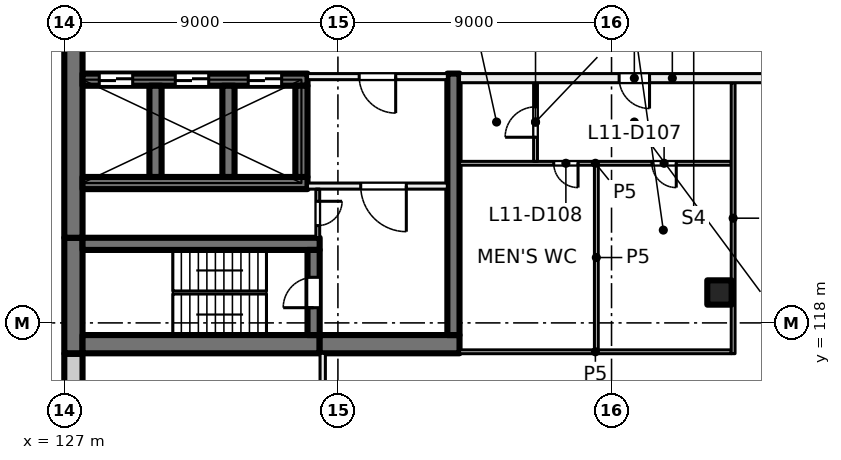
"""IFC4 building model, lengths in metres.
Left out: names, types, materials, properties, quantities, classifications, styles, units other than length and angle.
Written with IfcOpenShell. Run it as: python <this file> out.ifc"""

import sys

from ifc_helpers import new_model, si_unit, direction, frame, frame_2d, origin, origin_2d, place, context, subcontext, project, spatial, rectangle, extrude, element, fill, save


model = new_model("IFC4")
c1 = context("Model", 3, precision=1e-05, world=origin(), true_north=direction((0.0, 1.0)))
c2 = subcontext(c1, "Body", "Model", "MODEL_VIEW")
j1 = project(units=[si_unit("LENGTHUNIT", "METRE"), si_unit("PLANEANGLEUNIT", "RADIAN")], contexts=[c1])
p1 = place(None, origin())
s1 = spatial("IfcSite", under=j1, at=p1, CompositionType="ELEMENT")
p2 = place(p1, origin())
s2 = spatial("IfcBuilding", under=s1, at=p2, CompositionType="ELEMENT")
p3 = place(p2, frame((0.0, 0.0, 51.5)))
s3 = spatial("IfcBuildingStorey", under=s2, at=p3, CompositionType="ELEMENT", Elevation=51.5)
p4 = place(p3, frame((148.55, 119.0, 0.0), z_axis=(0.0, 0.0, 1.0), x_axis=(1.0, 0.0, 0.0)))
e1 = element("IfcColumn", 1, at=p4, inside=s3, PredefinedType="COLUMN", context=c2, shape_type="SweptSolid", body=[
    extrude(rectangle(XDim=0.8, YDim=0.8, at=origin_2d()), origin(), (0.0, 0.0, 1.0), 4.0),
])
p5 = place(p3, frame((127.3, 117.0, 0.0), z_axis=(0.0, 0.0, 1.0), x_axis=(0.0, 1.0, 0.0)))
e2 = element("IfcWall", 2, at=p5, inside=s3, PredefinedType="SHEAR", context=c2, shape_type="SweptSolid", body=[
    extrude(rectangle(XDim=3.8, YDim=0.6, at=frame_2d((1.9, 0.0))), origin(), (0.0, 0.0, 1.0), 4.0),
])
p6 = place(p3, frame((127.3, 120.8, 0.0), z_axis=(0.0, 0.0, 1.0), x_axis=(0.0, 1.0, 0.0)))
e3 = element("IfcWall", 3, at=p6, inside=s3, PredefinedType="SHEAR", context=c2, shape_type="SweptSolid", body=[
    extrude(rectangle(XDim=14.4, YDim=0.6, at=frame_2d((7.2, 0.0))), origin(), (0.0, 0.0, 1.0), 4.0),
])
p7 = place(p3, frame((127.6, 117.3, 0.0), z_axis=(0.0, 0.0, 1.0), x_axis=(1.0, 0.0, 0.0)))
e4 = element("IfcWall", 4, at=p7, inside=s3, PredefinedType="SHEAR", context=c2, shape_type="SweptSolid", body=[
    extrude(rectangle(XDim=7.8, YDim=0.6, at=frame_2d((3.9, 0.0))), origin(), (0.0, 0.0, 1.0), 4.0),
])
p8 = place(p3, frame((135.4, 117.3, 0.0), z_axis=(0.0, 0.0, 1.0), x_axis=(1.0, 0.0, 0.0)))
e5 = element("IfcWall", 5, at=p8, inside=s3, PredefinedType="SHEAR", context=c2, shape_type="SweptSolid", body=[
    extrude(rectangle(XDim=4.6, YDim=0.6, at=frame_2d((2.3, 0.0))), origin(), (0.0, 0.0, 1.0), 4.0),
])
p9 = place(p3, frame((127.6, 120.6, 0.0), z_axis=(0.0, 0.0, 1.0), x_axis=(1.0, 0.0, 0.0)))
e6 = element("IfcWall", 6, at=p9, inside=s3, PredefinedType="SHEAR", context=c2, shape_type="SweptSolid", body=[
    extrude(rectangle(XDim=7.8, YDim=0.4, at=frame_2d((3.9, 0.0))), origin(), (0.0, 0.0, 1.0), 4.0),
])
p10 = place(p3, frame((135.2, 117.6, 0.0), z_axis=(0.0, 0.0, 1.0), x_axis=(0.0, 1.0, 0.0)))
e7 = element("IfcWall", 7, at=p10, inside=s3, PredefinedType="SHEAR", context=c2, shape_type="SweptSolid", body=[
    extrude(rectangle(XDim=2.8, YDim=0.4, at=frame_2d((1.4, 0.0))), origin(), (0.0, 0.0, 1.0), 4.0),
])
p11 = place(p10, frame((0.9, 0.0, 0.0)))
e8 = element("IfcOpeningElement", 8, at=p11, cuts=e7, PredefinedType="OPENING", context=c2, shape_type="SweptSolid", body=[
    extrude(rectangle(XDim=1.0, YDim=2.1, at=frame_2d((0.5, 1.05))), frame((0.0, 0.21, 0.0), z_axis=(0.0, -1.0, 0.0), x_axis=(1.0, 0.0, 0.0)), (0.0, 0.0, 1.0), 0.42),
])
p12 = place(p3, frame((127.6, 126.0, 0.0), z_axis=(0.0, 0.0, 1.0), x_axis=(1.0, 0.0, 0.0)))
e9 = element("IfcWall", 9, at=p12, inside=s3, PredefinedType="SHEAR", context=c2, shape_type="SweptSolid", body=[
    extrude(rectangle(XDim=7.4, YDim=0.4, at=frame_2d((3.7, 0.0))), origin(), (0.0, 0.0, 1.0), 4.0),
])
p13 = place(p12, frame((0.55, 0.0, 0.0)))
e10 = element("IfcOpeningElement", 10, at=p13, cuts=e9, PredefinedType="OPENING", context=c2, shape_type="SweptSolid", body=[
    extrude(rectangle(XDim=1.1, YDim=2.1, at=frame_2d((0.55, 1.05))), frame((0.0, 0.21, 0.0), z_axis=(0.0, -1.0, 0.0), x_axis=(1.0, 0.0, 0.0)), (0.0, 0.0, 1.0), 0.42),
])
p14 = place(p12, frame((3.05, 0.0, 0.0)))
e11 = element("IfcOpeningElement", 11, at=p14, cuts=e9, PredefinedType="OPENING", context=c2, shape_type="SweptSolid", body=[
    extrude(rectangle(XDim=1.1, YDim=2.1, at=frame_2d((0.55, 1.05))), frame((0.0, 0.21, 0.0), z_axis=(0.0, -1.0, 0.0), x_axis=(1.0, 0.0, 0.0)), (0.0, 0.0, 1.0), 0.42),
])
p15 = place(p12, frame((5.45, 0.0, 0.0)))
e12 = element("IfcOpeningElement", 12, at=p15, cuts=e9, PredefinedType="OPENING", context=c2, shape_type="SweptSolid", body=[
    extrude(rectangle(XDim=1.1, YDim=2.1, at=frame_2d((0.55, 1.05))), frame((0.0, 0.21, 0.0), z_axis=(0.0, -1.0, 0.0), x_axis=(1.0, 0.0, 0.0)), (0.0, 0.0, 1.0), 0.42),
])
p16 = place(p3, frame((127.6, 122.6, 0.0), z_axis=(0.0, 0.0, 1.0), x_axis=(1.0, 0.0, 0.0)))
e13 = element("IfcWall", 13, at=p16, inside=s3, PredefinedType="SHEAR", context=c2, shape_type="SweptSolid", body=[
    extrude(rectangle(XDim=7.4, YDim=0.4, at=frame_2d((3.7, 0.0))), origin(), (0.0, 0.0, 1.0), 4.0),
])
for number, where, z_axis, x_axis in (
    (14, (130.0, 122.8, 0.0), (0.0, 0.0, 1.0), (0.0, 1.0, 0.0)),
    (15, (132.4, 122.8, 0.0), (0.0, 0.0, 1.0), (0.0, 1.0, 0.0)),
    (16, (134.8, 122.8, 0.0), (0.0, 0.0, 1.0), (0.0, 1.0, 0.0)),
):
    element("IfcWall", number, at=place(p3, frame(where, z_axis=z_axis, x_axis=x_axis)), inside=s3, PredefinedType="SHEAR", context=c2, shape_type="SweptSolid", body=[
        extrude(rectangle(XDim=3.0, YDim=0.4, at=frame_2d((1.5, 0.0))), origin(), (0.0, 0.0, 1.0), 4.0),
    ])
p17 = place(p3, frame((139.8, 117.6, 0.0), z_axis=(0.0, 0.0, 1.0), x_axis=(0.0, 1.0, 0.0)))
e17 = element("IfcWall", 17, at=p17, inside=s3, PredefinedType="SHEAR", context=c2, shape_type="SweptSolid", body=[
    extrude(rectangle(XDim=8.6, YDim=0.4, at=frame_2d((4.3, 0.0))), origin(), (0.0, 0.0, 1.0), 4.0),
])
p18 = place(p3, frame((127.3, 114.07, 0.0), z_axis=(0.0, 0.0, 1.0), x_axis=(0.0, 1.0, 0.0)))
e18 = element("IfcWall", 18, at=p18, inside=s3, PredefinedType="SOLIDWALL", context=c2, shape_type="SweptSolid", body=[
    extrude(rectangle(XDim=2.91, YDim=0.6, at=frame_2d((1.455, 0.0))), origin(), (0.0, 0.0, 1.0), 3.625),
])
p19 = place(p3, frame((139.6, 126.1, 0.0), z_axis=(0.0, 0.0, 1.0), x_axis=(-1.0, 0.0, 0.0)))
e19 = element("IfcWall", 19, at=p19, inside=s3, PredefinedType="PARTITIONING", context=c2, shape_type="SweptSolid", body=[
    extrude(rectangle(XDim=4.6, YDim=0.2, at=frame_2d((2.3, 0.0))), origin(), (0.0, 0.0, 1.0), 3.625),
])
p20 = place(p19, frame((1.7, 0.0, 0.0)))
e20 = element("IfcOpeningElement", 20, at=p20, cuts=e19, PredefinedType="OPENING", context=c2, shape_type="SweptSolid", body=[
    extrude(rectangle(XDim=1.2, YDim=2.1, at=frame_2d((0.6, 1.05))), frame((0.0, 0.11, 0.0), z_axis=(0.0, -1.0, 0.0), x_axis=(1.0, 0.0, 0.0)), (0.0, 0.0, 1.0), 0.22),
])
p21 = place(p3, frame((139.6, 122.5, 0.0), z_axis=(0.0, 0.0, 1.0), x_axis=(-1.0, 0.0, 0.0)))
e21 = element("IfcWall", 21, at=p21, inside=s3, PredefinedType="PARTITIONING", context=c2, shape_type="SweptSolid", body=[
    extrude(rectangle(XDim=4.6, YDim=0.2, at=frame_2d((2.3, 0.0))), origin(), (0.0, 0.0, 1.0), 3.625),
])
p22 = place(p21, frame((1.35, 0.0, 0.0)))
e22 = element("IfcOpeningElement", 22, at=p22, cuts=e21, PredefinedType="OPENING", context=c2, shape_type="SweptSolid", body=[
    extrude(rectangle(XDim=1.5, YDim=2.1, at=frame_2d((0.75, 1.05))), frame((0.0, 0.11, 0.0), z_axis=(0.0, -1.0, 0.0), x_axis=(1.0, 0.0, 0.0)), (0.0, 0.0, 1.0), 0.22),
])
p23 = place(p3, frame((135.337, 122.4, 0.0), z_axis=(0.0, 0.0, 1.0), x_axis=(0.0, -1.0, 0.0)))
e23 = element("IfcWall", 23, at=p23, inside=s3, PredefinedType="PARTITIONING", context=c2, shape_type="SweptSolid", body=[
    extrude(rectangle(XDim=1.6, YDim=0.125, at=frame_2d((0.8, 0.0))), origin(), (0.0, 0.0, 1.0), 3.625),
])
p24 = place(p23, frame((0.4, 0.0, 0.0)))
e24 = element("IfcOpeningElement", 24, at=p24, cuts=e23, PredefinedType="OPENING", context=c2, shape_type="SweptSolid", body=[
    extrude(rectangle(XDim=0.8, YDim=2.1, at=frame_2d((0.4, 1.05))), frame((0.0, 0.073, 0.0), z_axis=(0.0, -1.0, 0.0), x_axis=(1.0, 0.0, 0.0)), (0.0, 0.0, 1.0), 0.145),
])
p25 = place(p3, frame((135.5, 117.0, 0.0), z_axis=(0.0, 0.0, 1.0), x_axis=(0.0, -1.0, 0.0)))
e25 = element("IfcWall", 25, at=p25, inside=s3, PredefinedType="PARTITIONING", context=c2, shape_type="SweptSolid", body=[
    extrude(rectangle(XDim=6.4, YDim=0.175, at=frame_2d((3.2, 0.0))), origin(), (0.0, 0.0, 1.0), 3.625),
])
p26 = place(p25, frame((2.6, 0.0, 0.0)))
e26 = element("IfcOpeningElement", 26, at=p26, cuts=e25, PredefinedType="OPENING", context=c2, shape_type="SweptSolid", body=[
    extrude(rectangle(XDim=1.2, YDim=2.1, at=frame_2d((0.6, 1.05))), frame((0.0, 0.097, 0.0), z_axis=(0.0, -1.0, 0.0), x_axis=(1.0, 0.0, 0.0)), (0.0, 0.0, 1.0), 0.195),
])
p27 = place(p3, frame((140.0, 117.05, 0.0), z_axis=(0.0, 0.0, 1.0), x_axis=(1.0, 0.0, 0.0)))
e27 = element("IfcWall", 27, at=p27, inside=s3, PredefinedType="PARTITIONING", context=c2, shape_type="SweptSolid", body=[
    extrude(rectangle(XDim=8.938, YDim=0.125, at=frame_2d((4.469, 0.0))), origin(), (0.0, 0.0, 1.0), 3.625),
])
p28 = place(p3, frame((148.938, 123.25, 0.0), z_axis=(0.0, 0.0, 1.0), x_axis=(-1.0, 0.0, 0.0)))
e28 = element("IfcWall", 28, at=p28, inside=s3, PredefinedType="PARTITIONING", context=c2, shape_type="SweptSolid", body=[
    extrude(rectangle(XDim=8.938, YDim=0.125, at=frame_2d((4.469, 0.0))), origin(), (0.0, 0.0, 1.0), 3.625),
])
p29 = place(p28, frame((1.809, 0.0, 0.0)))
e29 = element("IfcOpeningElement", 29, at=p29, cuts=e28, PredefinedType="OPENING", context=c2, shape_type="SweptSolid", body=[
    extrude(rectangle(XDim=0.8, YDim=2.1, at=frame_2d((0.4, 1.05))), frame((0.0, 0.073, 0.0), z_axis=(0.0, -1.0, 0.0), x_axis=(1.0, 0.0, 0.0)), (0.0, 0.0, 1.0), 0.145),
])
p30 = place(p28, frame((5.04, 0.0, 0.0)))
e30 = element("IfcOpeningElement", 30, at=p30, cuts=e28, PredefinedType="OPENING", context=c2, shape_type="SweptSolid", body=[
    extrude(rectangle(XDim=0.8, YDim=2.1, at=frame_2d((0.4, 1.05))), frame((0.0, 0.073, 0.0), z_axis=(0.0, -1.0, 0.0), x_axis=(1.0, 0.0, 0.0)), (0.0, 0.0, 1.0), 0.145),
])
p31 = place(p3, frame((142.5, 123.312, 0.0), z_axis=(0.0, 0.0, 1.0), x_axis=(0.0, 1.0, 0.0)))
e31 = element("IfcWall", 31, at=p31, inside=s3, PredefinedType="PARTITIONING", context=c2, shape_type="SweptSolid", body=[
    extrude(rectangle(XDim=2.588, YDim=0.125, at=frame_2d((1.294, 0.0))), origin(), (0.0, 0.0, 1.0), 3.625),
])
p32 = place(p31, frame((0.794, 0.0, 0.0)))
e32 = element("IfcOpeningElement", 32, at=p32, cuts=e31, PredefinedType="OPENING", context=c2, shape_type="SweptSolid", body=[
    extrude(rectangle(XDim=1.0, YDim=2.1, at=frame_2d((0.5, 1.05))), frame((0.0, 0.073, 0.0), z_axis=(0.0, -1.0, 0.0), x_axis=(1.0, 0.0, 0.0)), (0.0, 0.0, 1.0), 0.145),
])
p33 = place(p3, frame((144.5, 123.188, 0.0), z_axis=(0.0, 0.0, 1.0), x_axis=(0.0, -1.0, 0.0)))
e33 = element("IfcWall", 33, at=p33, inside=s3, PredefinedType="PARTITIONING", context=c2, shape_type="SweptSolid", body=[
    extrude(rectangle(XDim=6.076, YDim=0.125, at=frame_2d((3.038, 0.0))), origin(), (0.0, 0.0, 1.0), 3.625),
])
p34 = place(p3, frame((149.0, 116.988, 0.0), z_axis=(0.0, 0.0, 1.0), x_axis=(0.0, 1.0, 0.0)))
e34 = element("IfcWall", 34, at=p34, inside=s3, PredefinedType="PARTITIONING", context=c2, shape_type="SweptSolid", body=[
    extrude(rectangle(XDim=8.912, YDim=0.125, at=frame_2d((4.456, 0.0))), origin(), (0.0, 0.0, 1.0), 3.625),
])
p35 = place(p3, frame((154.0, 126.05, 0.0), z_axis=(0.0, 0.0, 1.0), x_axis=(-1.0, 0.0, 0.0)))
e35 = element("IfcWall", 35, at=p35, inside=s3, PredefinedType="PARTITIONING", context=c2, shape_type="SweptSolid", body=[
    extrude(rectangle(XDim=14.0, YDim=0.3, at=frame_2d((7.0, 0.0))), origin(), (0.0, 0.0, 1.0), 3.625),
])
p36 = place(p35, frame((7.75, 0.0, 0.0)))
e36 = element("IfcOpeningElement", 36, at=p36, cuts=e35, PredefinedType="OPENING", context=c2, shape_type="SweptSolid", body=[
    extrude(rectangle(XDim=1.0, YDim=2.1, at=frame_2d((0.5, 1.05))), frame((0.0, 0.16, 0.0), z_axis=(0.0, -1.0, 0.0), x_axis=(1.0, 0.0, 0.0)), (0.0, 0.0, 1.0), 0.32),
])
p37 = place(p35, frame((1.6, 0.0, 0.0)))
e37 = element("IfcOpeningElement", 37, at=p37, cuts=e35, PredefinedType="OPENING", context=c2, shape_type="SweptSolid", body=[
    extrude(rectangle(XDim=1.8, YDim=2.1, at=frame_2d((0.9, 1.05))), frame((0.0, 0.16, 0.0), z_axis=(0.0, -1.0, 0.0), x_axis=(1.0, 0.0, 0.0)), (0.0, 0.0, 1.0), 0.32),
])
p38 = place(p13, origin())
e38 = element("IfcDoor", 38, at=p38, inside=s3, OperationType="DOUBLE_DOOR_SLIDING", PredefinedType="DOOR", context=c2, shape_type="SweptSolid", body=[
    extrude(rectangle(XDim=1.1, YDim=2.1, at=frame_2d((0.55, 1.05))), frame((0.0, 0.025, 0.0), z_axis=(0.0, -1.0, 0.0), x_axis=(1.0, 0.0, 0.0)), (0.0, 0.0, 1.0), 0.05),
])
fill(e10, e38)
p39 = place(p14, origin())
e39 = element("IfcDoor", 39, at=p39, inside=s3, OperationType="DOUBLE_DOOR_SLIDING", PredefinedType="DOOR", context=c2, shape_type="SweptSolid", body=[
    extrude(rectangle(XDim=1.1, YDim=2.1, at=frame_2d((0.55, 1.05))), frame((0.0, 0.025, 0.0), z_axis=(0.0, -1.0, 0.0), x_axis=(1.0, 0.0, 0.0)), (0.0, 0.0, 1.0), 0.05),
])
fill(e11, e39)
p40 = place(p15, origin())
e40 = element("IfcDoor", 40, at=p40, inside=s3, OperationType="DOUBLE_DOOR_SLIDING", PredefinedType="DOOR", context=c2, shape_type="SweptSolid", body=[
    extrude(rectangle(XDim=1.1, YDim=2.1, at=frame_2d((0.55, 1.05))), frame((0.0, 0.025, 0.0), z_axis=(0.0, -1.0, 0.0), x_axis=(1.0, 0.0, 0.0)), (0.0, 0.0, 1.0), 0.05),
])
fill(e12, e40)
p41 = place(p20, origin())
e41 = element("IfcDoor", 41, at=p41, inside=s3, OperationType="DOUBLE_DOOR_SINGLE_SWING", PredefinedType="DOOR", context=c2, shape_type="SweptSolid", body=[
    extrude(rectangle(XDim=1.2, YDim=2.1, at=frame_2d((0.6, 1.05))), frame((0.0, 0.025, 0.0), z_axis=(0.0, -1.0, 0.0), x_axis=(1.0, 0.0, 0.0)), (0.0, 0.0, 1.0), 0.05),
])
fill(e20, e41)
p42 = place(p22, origin())
e42 = element("IfcDoor", 42, at=p42, inside=s3, OperationType="DOUBLE_DOOR_SINGLE_SWING", PredefinedType="DOOR", context=c2, shape_type="SweptSolid", body=[
    extrude(rectangle(XDim=1.5, YDim=2.1, at=frame_2d((0.75, 1.05))), frame((0.0, 0.025, 0.0), z_axis=(0.0, -1.0, 0.0), x_axis=(1.0, 0.0, 0.0)), (0.0, 0.0, 1.0), 0.05),
])
fill(e22, e42)
p43 = place(p11, origin())
e43 = element("IfcDoor", 43, at=p43, inside=s3, OperationType="SINGLE_SWING_RIGHT", PredefinedType="DOOR", context=c2, shape_type="SweptSolid", body=[
    extrude(rectangle(XDim=1.0, YDim=2.1, at=frame_2d((0.5, 1.05))), frame((0.0, 0.025, 0.0), z_axis=(0.0, -1.0, 0.0), x_axis=(1.0, 0.0, 0.0)), (0.0, 0.0, 1.0), 0.05),
])
fill(e8, e43)
p44 = place(p24, origin())
e44 = element("IfcDoor", 44, at=p44, inside=s3, OperationType="SINGLE_SWING_LEFT", PredefinedType="DOOR", context=c2, shape_type="SweptSolid", body=[
    extrude(rectangle(XDim=0.8, YDim=2.1, at=frame_2d((0.4, 1.05))), frame((0.0, 0.025, 0.0), z_axis=(0.0, -1.0, 0.0), x_axis=(1.0, 0.0, 0.0)), (0.0, 0.0, 1.0), 0.05),
])
fill(e24, e44)
p45 = place(p36, origin())
e45 = element("IfcDoor", 45, at=p45, inside=s3, OperationType="SINGLE_SWING_RIGHT", PredefinedType="DOOR", context=c2, shape_type="SweptSolid", body=[
    extrude(rectangle(XDim=1.0, YDim=2.1, at=frame_2d((0.5, 1.05))), frame((0.0, 0.025, 0.0), z_axis=(0.0, -1.0, 0.0), x_axis=(1.0, 0.0, 0.0)), (0.0, 0.0, 1.0), 0.05),
])
fill(e36, e45)
p46 = place(p32, origin())
e46 = element("IfcDoor", 46, at=p46, inside=s3, OperationType="SINGLE_SWING_RIGHT", PredefinedType="DOOR", context=c2, shape_type="SweptSolid", body=[
    extrude(rectangle(XDim=1.0, YDim=2.1, at=frame_2d((0.5, 1.05))), frame((0.0, 0.025, 0.0), z_axis=(0.0, -1.0, 0.0), x_axis=(1.0, 0.0, 0.0)), (0.0, 0.0, 1.0), 0.05),
])
fill(e32, e46)
p47 = place(p29, origin())
e47 = element("IfcDoor", 47, at=p47, inside=s3, OperationType="SINGLE_SWING_LEFT", PredefinedType="DOOR", context=c2, shape_type="SweptSolid", body=[
    extrude(rectangle(XDim=0.8, YDim=2.1, at=frame_2d((0.4, 1.05))), frame((0.0, 0.025, 0.0), z_axis=(0.0, -1.0, 0.0), x_axis=(1.0, 0.0, 0.0)), (0.0, 0.0, 1.0), 0.05),
])
fill(e29, e47)
p48 = place(p30, origin())
e48 = element("IfcDoor", 48, at=p48, inside=s3, OperationType="SINGLE_SWING_LEFT", PredefinedType="DOOR", context=c2, shape_type="SweptSolid", body=[
    extrude(rectangle(XDim=0.8, YDim=2.1, at=frame_2d((0.4, 1.05))), frame((0.0, 0.025, 0.0), z_axis=(0.0, -1.0, 0.0), x_axis=(1.0, 0.0, 0.0)), (0.0, 0.0, 1.0), 0.05),
])
fill(e30, e48)
save(model, sys.argv[1])
